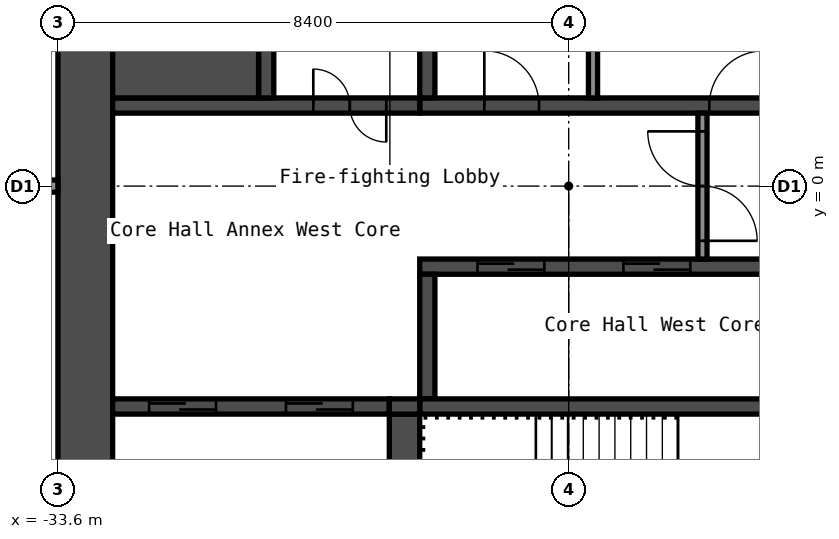
"""IFC4 building model, lengths in metres.
Left out: names, types, materials, properties, quantities, classifications, styles, units other than length and angle.
Written with IfcOpenShell. Run it as: python <this file> out.ifc"""

import sys

from ifc_helpers import new_model, si_unit, direction, frame, frame_2d, origin, place, context, subcontext, project, spatial, rectangle, extrude, element, fill, save


model = new_model("IFC4")
c1 = context("Model", 3, precision=1e-05, world=origin(), true_north=direction((0.0, 1.0)))
c2 = subcontext(c1, "Body", "Model", "MODEL_VIEW")
j1 = project(units=[si_unit("LENGTHUNIT", "METRE"), si_unit("PLANEANGLEUNIT", "RADIAN")], contexts=[c1])
p1 = place(None, origin())
s1 = spatial("IfcSite", under=j1, at=p1, CompositionType="ELEMENT")
p2 = place(p1, origin())
s2 = spatial("IfcBuilding", under=s1, at=p2, CompositionType="ELEMENT")
p3 = place(p2, frame((0.0, 0.0, 131.0)))
s3 = spatial("IfcBuildingStorey", under=s2, at=p3, CompositionType="ELEMENT", Elevation=131.0)
p4 = place(p3, frame((-33.15, -8.4, 0.0), z_axis=(0.0, 0.0, 1.0), x_axis=(0.0, 1.0, 0.0)))
e1 = element("IfcWall", 1, at=p4, inside=s3, PredefinedType="SHEAR", context=c2, shape_type="SweptSolid", body=[
    extrude(rectangle(XDim=16.8, YDim=0.9, at=frame_2d((8.4, 0.0))), origin(), (0.0, 0.0, 1.0), 2.75),
])
p5 = place(p3, frame((-27.65, 1.325, 0.0), z_axis=(0.0, 0.0, 1.0), x_axis=(1.0, 0.0, 0.0)))
e2 = element("IfcWall", 2, at=p5, inside=s3, PredefinedType="SHEAR", context=c2, shape_type="SweptSolid", body=[
    extrude(rectangle(XDim=7.5, YDim=0.25, at=frame_2d((3.75, 0.0))), origin(), (0.0, 0.0, 1.0), 2.75),
])
p6 = place(p5, frame((4.762, 0.0, 0.0)))
e3 = element("IfcOpeningElement", 3, at=p6, cuts=e2, PredefinedType="OPENING", context=c2, shape_type="SweptSolid", body=[
    extrude(rectangle(XDim=0.9, YDim=2.1, at=frame_2d((0.45, 1.05))), frame((0.0, 0.135, 0.0), z_axis=(0.0, -1.0, 0.0), x_axis=(1.0, 0.0, 0.0)), (0.0, 0.0, 1.0), 0.27),
])
p7 = place(p5, frame((1.062, 0.0, 0.0)))
e4 = element("IfcOpeningElement", 4, at=p7, cuts=e2, PredefinedType="OPENING", context=c2, shape_type="SweptSolid", body=[
    extrude(rectangle(XDim=0.9, YDim=2.1, at=frame_2d((0.45, 1.05))), frame((0.0, 0.135, 0.0), z_axis=(0.0, -1.0, 0.0), x_axis=(1.0, 0.0, 0.0)), (0.0, 0.0, 1.0), 0.27),
])
p8 = place(p3, frame((-27.525, 1.45, 0.0), z_axis=(0.0, 0.0, 1.0), x_axis=(0.0, 1.0, 0.0)))
e5 = element("IfcWall", 5, at=p8, inside=s3, PredefinedType="SHEAR", context=c2, shape_type="SweptSolid", body=[
    extrude(rectangle(XDim=2.05, YDim=0.25, at=frame_2d((1.025, 0.0))), origin(), (0.0, 0.0, 1.0), 2.75),
])
p9 = place(p3, frame((-32.7, 1.325, 0.0), z_axis=(0.0, 0.0, 1.0), x_axis=(1.0, 0.0, 0.0)))
e6 = element("IfcWall", 6, at=p9, inside=s3, PredefinedType="SHEAR", context=c2, shape_type="SweptSolid", body=[
    extrude(rectangle(XDim=5.05, YDim=0.25, at=frame_2d((2.525, 0.0))), origin(), (0.0, 0.0, 1.0), 2.75),
])
p10 = place(p9, frame((3.3, 0.0, 0.0)))
e7 = element("IfcOpeningElement", 7, at=p10, cuts=e6, PredefinedType="OPENING", context=c2, shape_type="SweptSolid", body=[
    extrude(rectangle(XDim=1.2, YDim=2.1, at=frame_2d((0.6, 1.05))), frame((0.0, 0.135, 0.0), z_axis=(0.0, -1.0, 0.0), x_axis=(1.0, 0.0, 0.0)), (0.0, 0.0, 1.0), 0.27),
])
p11 = place(p3, frame((-30.175, 1.45, 0.0), z_axis=(0.0, 0.0, 1.0), x_axis=(0.0, 1.0, 0.0)))
e8 = element("IfcWall", 8, at=p11, inside=s3, PredefinedType="SHEAR", context=c2, shape_type="SweptSolid", body=[
    extrude(rectangle(XDim=6.05, YDim=0.25, at=frame_2d((3.025, 0.0))), origin(), (0.0, 0.0, 1.0), 2.75),
])
p12 = place(p11, frame((2.625, 0.0, 0.0)))
e9 = element("IfcOpeningElement", 9, at=p12, cuts=e8, PredefinedType="OPENING", context=c2, shape_type="SweptSolid", body=[
    extrude(rectangle(XDim=1.1, YDim=2.1, at=frame_2d((0.55, 1.05))), frame((0.0, 0.135, 0.0), z_axis=(0.0, -1.0, 0.0), x_axis=(1.0, 0.0, 0.0)), (0.0, 0.0, 1.0), 0.27),
])
p13 = place(p3, frame((-32.7, 2.375, 0.0), z_axis=(0.0, 0.0, 1.0), x_axis=(1.0, 0.0, 0.0)))
e10 = element("IfcWall", 10, at=p13, inside=s3, PredefinedType="SHEAR", context=c2, shape_type="SweptSolid", body=[
    extrude(rectangle(XDim=2.4, YDim=1.85, at=frame_2d((1.2, 0.0))), origin(), (0.0, 0.0, 1.0), 2.75),
])
p14 = place(p3, frame((-27.65, -1.325, 0.0), z_axis=(0.0, 0.0, 1.0), x_axis=(1.0, 0.0, 0.0)))
e11 = element("IfcWall", 11, at=p14, inside=s3, PredefinedType="SHEAR", context=c2, shape_type="SweptSolid", body=[
    extrude(rectangle(XDim=7.5, YDim=0.25, at=frame_2d((3.75, 0.0))), origin(), (0.0, 0.0, 1.0), 2.75),
])
p15 = place(p14, frame((5.75, 0.0, 0.0)))
e12 = element("IfcOpeningElement", 12, at=p15, cuts=e11, PredefinedType="OPENING", context=c2, shape_type="SweptSolid", body=[
    extrude(rectangle(XDim=1.1, YDim=2.1, at=frame_2d((0.55, 1.05))), frame((0.0, 0.135, 0.0), z_axis=(0.0, -1.0, 0.0), x_axis=(1.0, 0.0, 0.0)), (0.0, 0.0, 1.0), 0.27),
])
p16 = place(p14, frame((3.35, 0.0, 0.0)))
e13 = element("IfcOpeningElement", 13, at=p16, cuts=e11, PredefinedType="OPENING", context=c2, shape_type="SweptSolid", body=[
    extrude(rectangle(XDim=1.1, YDim=2.1, at=frame_2d((0.55, 1.05))), frame((0.0, 0.135, 0.0), z_axis=(0.0, -1.0, 0.0), x_axis=(1.0, 0.0, 0.0)), (0.0, 0.0, 1.0), 0.27),
])
p17 = place(p14, frame((0.95, 0.0, 0.0)))
e14 = element("IfcOpeningElement", 14, at=p17, cuts=e11, PredefinedType="OPENING", context=c2, shape_type="SweptSolid", body=[
    extrude(rectangle(XDim=1.1, YDim=2.1, at=frame_2d((0.55, 1.05))), frame((0.0, 0.135, 0.0), z_axis=(0.0, -1.0, 0.0), x_axis=(1.0, 0.0, 0.0)), (0.0, 0.0, 1.0), 0.27),
])
p18 = place(p3, frame((-27.525, -3.5, 0.0), z_axis=(0.0, 0.0, 1.0), x_axis=(0.0, 1.0, 0.0)))
e15 = element("IfcWall", 15, at=p18, inside=s3, PredefinedType="SHEAR", context=c2, shape_type="SweptSolid", body=[
    extrude(rectangle(XDim=2.05, YDim=0.25, at=frame_2d((1.025, 0.0))), origin(), (0.0, 0.0, 1.0), 2.75),
])
p19 = place(p3, frame((-27.65, -3.625, 0.0), z_axis=(0.0, 0.0, 1.0), x_axis=(1.0, 0.0, 0.0)))
e16 = element("IfcWall", 16, at=p19, inside=s3, PredefinedType="SHEAR", context=c2, shape_type="SweptSolid", body=[
    extrude(rectangle(XDim=7.5, YDim=0.25, at=frame_2d((3.75, 0.0))), origin(), (0.0, 0.0, 1.0), 2.75),
])
p20 = place(p3, frame((-27.9, -7.5, 0.0), z_axis=(0.0, 0.0, 1.0), x_axis=(0.0, 1.0, 0.0)))
e17 = element("IfcWall", 17, at=p20, inside=s3, PredefinedType="SHEAR", context=c2, shape_type="SweptSolid", body=[
    extrude(rectangle(XDim=3.75, YDim=0.5, at=frame_2d((1.875, 0.0))), origin(), (0.0, 0.0, 1.0), 2.75),
])
p21 = place(p3, frame((-32.7, -3.625, 0.0), z_axis=(0.0, 0.0, 1.0), x_axis=(1.0, 0.0, 0.0)))
e18 = element("IfcWall", 18, at=p21, inside=s3, PredefinedType="SHEAR", context=c2, shape_type="SweptSolid", body=[
    extrude(rectangle(XDim=4.55, YDim=0.25, at=frame_2d((2.275, 0.0))), origin(), (0.0, 0.0, 1.0), 2.75),
])
p22 = place(p21, frame((2.85, 0.0, 0.0)))
e19 = element("IfcOpeningElement", 19, at=p22, cuts=e18, PredefinedType="OPENING", context=c2, shape_type="SweptSolid", body=[
    extrude(rectangle(XDim=1.1, YDim=2.1, at=frame_2d((0.55, 1.05))), frame((0.0, 0.135, 0.0), z_axis=(0.0, -1.0, 0.0), x_axis=(1.0, 0.0, 0.0)), (0.0, 0.0, 1.0), 0.27),
])
p23 = place(p21, frame((0.6, 0.0, 0.0)))
e20 = element("IfcOpeningElement", 20, at=p23, cuts=e18, PredefinedType="OPENING", context=c2, shape_type="SweptSolid", body=[
    extrude(rectangle(XDim=1.1, YDim=2.1, at=frame_2d((0.55, 1.05))), frame((0.0, 0.135, 0.0), z_axis=(0.0, -1.0, 0.0), x_axis=(1.0, 0.0, 0.0)), (0.0, 0.0, 1.0), 0.27),
])
p24 = place(p3, frame((-28.15, -3.625, 0.0), z_axis=(0.0, 0.0, 1.0), x_axis=(1.0, 0.0, 0.0)))
e21 = element("IfcWall", 21, at=p24, inside=s3, PredefinedType="SHEAR", context=c2, shape_type="SweptSolid", body=[
    extrude(rectangle(XDim=0.5, YDim=0.25, at=frame_2d((0.25, 0.0))), origin(), (0.0, 0.0, 1.0), 2.75),
])
p25 = place(p3, frame((-23.0, -1.2, 0.0), z_axis=(0.0, 0.0, 1.0), x_axis=(0.0, 1.0, 0.0)))
e22 = element("IfcWall", 22, at=p25, inside=s3, PredefinedType="PARTITIONING", context=c2, shape_type="SweptSolid", body=[
    extrude(rectangle(XDim=2.4, YDim=0.15, at=frame_2d((1.2, 0.0))), origin(), (0.0, 0.0, 1.0), 2.75),
])
p26 = place(p25, frame((0.3, 0.0, 0.0)))
e23 = element("IfcOpeningElement", 23, at=p26, cuts=e22, PredefinedType="OPENING", context=c2, shape_type="SweptSolid", body=[
    extrude(rectangle(XDim=1.8, YDim=2.1, at=frame_2d((0.9, 1.05))), frame((0.0, 0.085, 0.0), z_axis=(0.0, -1.0, 0.0), x_axis=(1.0, 0.0, 0.0)), (0.0, 0.0, 1.0), 0.17),
])
p27 = place(p3, frame((-24.8, 1.45, 0.0), z_axis=(0.0, 0.0, 1.0), x_axis=(0.0, 1.0, 0.0)))
e24 = element("IfcWall", 24, at=p27, inside=s3, PredefinedType="PARTITIONING", context=c2, shape_type="SweptSolid", body=[
    extrude(rectangle(XDim=2.05, YDim=0.15, at=frame_2d((1.025, 0.0))), origin(), (0.0, 0.0, 1.0), 2.75),
])
p28 = place(p3, frame((-40.1, 0.0, 0.0), z_axis=(0.0, 0.0, 1.0), x_axis=(1.0, 0.0, 0.0)))
e25 = element("IfcWall", 25, at=p28, inside=s3, PredefinedType="PARTITIONING", context=c2, shape_type="SweptSolid", body=[
    extrude(rectangle(XDim=6.5, YDim=0.2, at=frame_2d((3.25, 0.0))), origin(), (0.0, 0.0, 1.0), 2.75),
])
p29 = place(p10, origin())
e26 = element("IfcDoor", 26, at=p29, inside=s3, OperationType="DOUBLE_DOOR_SINGLE_SWING", PredefinedType="DOOR", context=c2, shape_type="SweptSolid", body=[
    extrude(rectangle(XDim=1.2, YDim=2.1, at=frame_2d((0.6, 1.05))), frame((0.0, 0.025, 0.0), z_axis=(0.0, -1.0, 0.0), x_axis=(1.0, 0.0, 0.0)), (0.0, 0.0, 1.0), 0.05),
])
fill(e7, e26)
p30 = place(p26, origin())
e27 = element("IfcDoor", 27, at=p30, inside=s3, OperationType="DOUBLE_DOOR_SINGLE_SWING", PredefinedType="DOOR", context=c2, shape_type="SweptSolid", body=[
    extrude(rectangle(XDim=1.8, YDim=2.1, at=frame_2d((0.9, 1.05))), frame((0.0, 0.025, 0.0), z_axis=(0.0, -1.0, 0.0), x_axis=(1.0, 0.0, 0.0)), (0.0, 0.0, 1.0), 0.05),
])
fill(e23, e27)
p31 = place(p6, origin())
e28 = element("IfcDoor", 28, at=p31, inside=s3, OperationType="SINGLE_SWING_LEFT", PredefinedType="DOOR", context=c2, shape_type="SweptSolid", body=[
    extrude(rectangle(XDim=0.9, YDim=2.1, at=frame_2d((0.45, 1.05))), frame((0.0, 0.025, 0.0), z_axis=(0.0, -1.0, 0.0), x_axis=(1.0, 0.0, 0.0)), (0.0, 0.0, 1.0), 0.05),
])
fill(e3, e28)
p32 = place(p7, origin())
e29 = element("IfcDoor", 29, at=p32, inside=s3, OperationType="SINGLE_SWING_RIGHT", PredefinedType="DOOR", context=c2, shape_type="SweptSolid", body=[
    extrude(rectangle(XDim=0.9, YDim=2.1, at=frame_2d((0.45, 1.05))), frame((0.0, 0.025, 0.0), z_axis=(0.0, -1.0, 0.0), x_axis=(1.0, 0.0, 0.0)), (0.0, 0.0, 1.0), 0.05),
])
fill(e4, e29)
p33 = place(p16, origin())
e30 = element("IfcDoor", 30, at=p33, inside=s3, OperationType="DOUBLE_DOOR_SLIDING", PredefinedType="DOOR", context=c2, shape_type="SweptSolid", body=[
    extrude(rectangle(XDim=1.1, YDim=2.1, at=frame_2d((0.55, 1.05))), frame((0.0, 0.025, 0.0), z_axis=(0.0, -1.0, 0.0), x_axis=(1.0, 0.0, 0.0)), (0.0, 0.0, 1.0), 0.05),
])
fill(e13, e30)
p34 = place(p17, origin())
e31 = element("IfcDoor", 31, at=p34, inside=s3, OperationType="DOUBLE_DOOR_SLIDING", PredefinedType="DOOR", context=c2, shape_type="SweptSolid", body=[
    extrude(rectangle(XDim=1.1, YDim=2.1, at=frame_2d((0.55, 1.05))), frame((0.0, 0.025, 0.0), z_axis=(0.0, -1.0, 0.0), x_axis=(1.0, 0.0, 0.0)), (0.0, 0.0, 1.0), 0.05),
])
fill(e14, e31)
p35 = place(p22, origin())
e32 = element("IfcDoor", 32, at=p35, inside=s3, OperationType="DOUBLE_DOOR_SLIDING", PredefinedType="DOOR", context=c2, shape_type="SweptSolid", body=[
    extrude(rectangle(XDim=1.1, YDim=2.1, at=frame_2d((0.55, 1.05))), frame((0.0, 0.025, 0.0), z_axis=(0.0, -1.0, 0.0), x_axis=(1.0, 0.0, 0.0)), (0.0, 0.0, 1.0), 0.05),
])
fill(e19, e32)
p36 = place(p23, origin())
e33 = element("IfcDoor", 33, at=p36, inside=s3, OperationType="DOUBLE_DOOR_SLIDING", PredefinedType="DOOR", context=c2, shape_type="SweptSolid", body=[
    extrude(rectangle(XDim=1.1, YDim=2.1, at=frame_2d((0.55, 1.05))), frame((0.0, 0.025, 0.0), z_axis=(0.0, -1.0, 0.0), x_axis=(1.0, 0.0, 0.0)), (0.0, 0.0, 1.0), 0.05),
])
fill(e20, e33)
save(model, sys.argv[1])
